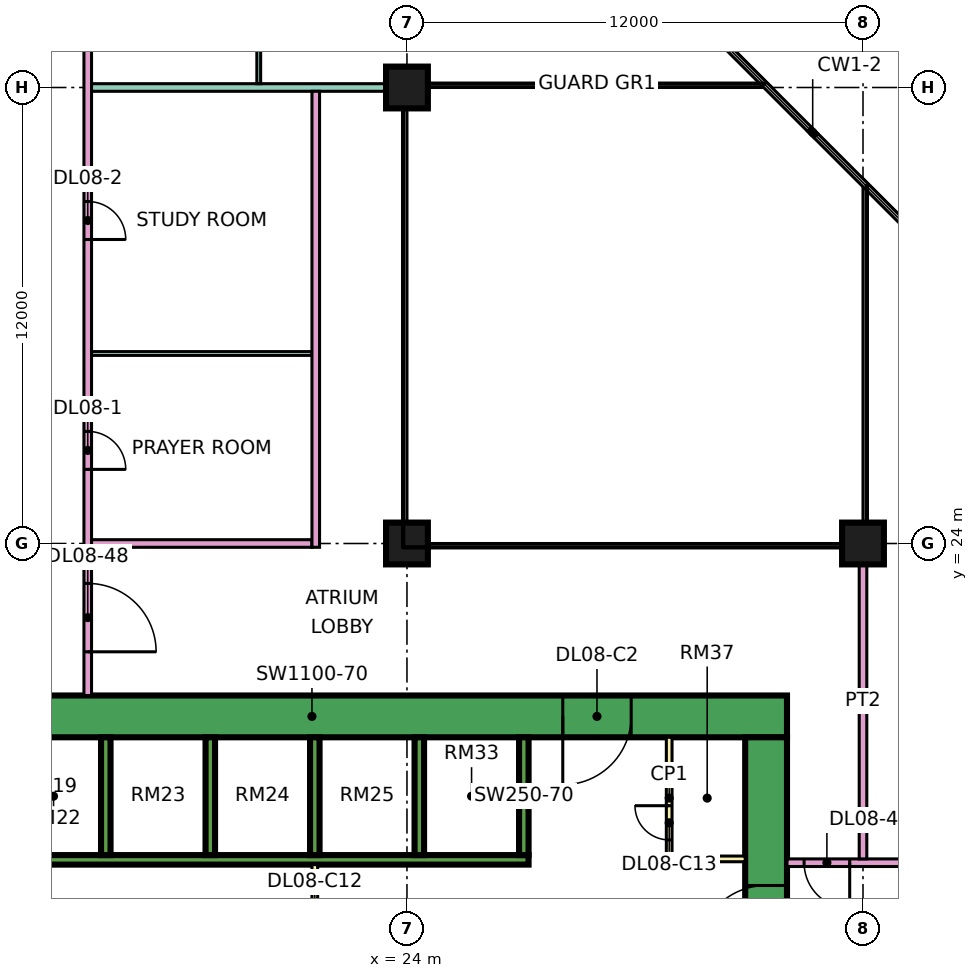
"""IFC4 building model, lengths in metres.
Left out: names, types, materials, properties, quantities, classifications, styles, units other than length and angle.
Written with IfcOpenShell. Run it as: python <this file> out.ifc"""

import sys

from ifc_helpers import new_model, si_unit, direction, frame, frame_2d, origin, origin_2d, place, context, subcontext, project, spatial, rectangle, extrude, element, fill, save


model = new_model("IFC4")
c1 = context("Model", 3, precision=1e-05, world=origin(), true_north=direction((0.0, 1.0)))
c2 = subcontext(c1, "Body", "Model", "MODEL_VIEW")
j1 = project(units=[si_unit("LENGTHUNIT", "METRE"), si_unit("PLANEANGLEUNIT", "RADIAN")], contexts=[c1])
p1 = place(None, origin())
s1 = spatial("IfcSite", under=j1, at=p1, CompositionType="ELEMENT")
p2 = place(p1, origin())
s2 = spatial("IfcBuilding", under=s1, at=p2, CompositionType="ELEMENT")
p3 = place(p2, frame((0.0, 0.0, 45.15)))
s3 = spatial("IfcBuildingStorey", under=s2, at=p3, CompositionType="ELEMENT", Elevation=45.15)
for number, where, z_axis, x_axis in (
    (1, (24.0, 24.0, 0.0), (0.0, 0.0, 1.0), (1.0, 0.0, 0.0)),
    (2, (24.0, 36.0, 0.0), (0.0, 0.0, 1.0), (1.0, 0.0, 0.0)),
    (3, (36.0, 24.0, 0.0), (0.0, 0.0, 1.0), (1.0, 0.0, 0.0)),
):
    element("IfcColumn", number, at=place(p3, frame(where, z_axis=z_axis, x_axis=x_axis)), inside=s3, PredefinedType="COLUMN", context=c2, shape_type="SweptSolid", body=[
        extrude(rectangle(XDim=1.1, YDim=1.1, at=origin_2d()), origin(), (0.0, 0.0, 1.0), 3.75),
    ])
p4 = place(p3, frame((9.0, 19.45, 0.0), z_axis=(0.0, 0.0, 1.0), x_axis=(1.0, 0.0, 0.0)))
e4 = element("IfcWall", 4, at=p4, inside=s3, PredefinedType="SHEAR", context=c2, shape_type="SweptSolid", body=[
    extrude(rectangle(XDim=25.0, YDim=1.1, at=frame_2d((12.5, 0.0))), origin(), (0.0, 0.0, 1.0), 3.75),
])
p5 = place(p4, frame((19.1, 0.0, 0.0)))
e5 = element("IfcOpeningElement", 5, at=p5, cuts=e4, PredefinedType="OPENING", context=c2, shape_type="SweptSolid", body=[
    extrude(rectangle(XDim=1.8, YDim=2.4, at=frame_2d((0.9, 1.2))), frame((0.0, 0.56, 0.0), z_axis=(0.0, -1.0, 0.0), x_axis=(1.0, 0.0, 0.0)), (0.0, 0.0, 1.0), 1.12),
])
p6 = place(p3, frame((33.45, 8.1, 0.0), z_axis=(0.0, 0.0, 1.0), x_axis=(0.0, 1.0, 0.0)))
e6 = element("IfcWall", 6, at=p6, inside=s3, PredefinedType="SHEAR", context=c2, shape_type="SweptSolid", body=[
    extrude(rectangle(XDim=10.8, YDim=1.1, at=frame_2d((5.4, 0.0))), origin(), (0.0, 0.0, 1.0), 3.75),
])
p7 = place(p6, frame((5.1, 0.0, 0.0)))
e7 = element("IfcOpeningElement", 7, at=p7, cuts=e6, PredefinedType="OPENING", context=c2, shape_type="SweptSolid", body=[
    extrude(rectangle(XDim=1.8, YDim=2.4, at=frame_2d((0.9, 1.2))), frame((0.0, 0.56, 0.0), z_axis=(0.0, -1.0, 0.0), x_axis=(1.0, 0.0, 0.0)), (0.0, 0.0, 1.0), 1.12),
])
p8 = place(p3, frame((13.45, 15.675, 0.0), z_axis=(0.0, 0.0, 1.0), x_axis=(1.0, 0.0, 0.0)))
e8 = element("IfcWall", 8, at=p8, inside=s3, PredefinedType="SHEAR", context=c2, shape_type="SweptSolid", body=[
    extrude(rectangle(XDim=13.75, YDim=0.25, at=frame_2d((6.875, 0.0))), origin(), (0.0, 0.0, 1.0), 3.75),
])
for number, where, z_axis, x_axis in (
    (9, (16.075, 15.8, 0.0), (0.0, 0.0, 1.0), (0.0, 1.0, 0.0)),
    (10, (18.825, 15.8, 0.0), (0.0, 0.0, 1.0), (0.0, 1.0, 0.0)),
    (11, (21.575, 15.8, 0.0), (0.0, 0.0, 1.0), (0.0, 1.0, 0.0)),
    (12, (24.325, 15.8, 0.0), (0.0, 0.0, 1.0), (0.0, 1.0, 0.0)),
    (13, (27.075, 15.8, 0.0), (0.0, 0.0, 1.0), (0.0, 1.0, 0.0)),
):
    element("IfcWall", number, at=place(p3, frame(where, z_axis=z_axis, x_axis=x_axis)), inside=s3, PredefinedType="SHEAR", context=c2, shape_type="SweptSolid", body=[
        extrude(rectangle(XDim=3.1, YDim=0.25, at=frame_2d((1.55, 0.0))), origin(), (0.0, 0.0, 1.0), 3.75),
    ])
p9 = place(p3, frame((21.575, 11.45, 0.0), z_axis=(0.0, 0.0, 1.0), x_axis=(0.0, 1.0, 0.0)))
e14 = element("IfcWall", 14, at=p9, inside=s3, PredefinedType="PARTITIONING", context=c2, shape_type="SweptSolid", body=[
    extrude(rectangle(XDim=4.1, YDim=0.15, at=frame_2d((2.05, 0.0))), origin(), (0.0, 0.0, 1.0), 3.35),
])
p10 = place(p9, frame((1.15, 0.0, 0.0)))
e15 = element("IfcOpeningElement", 15, at=p10, cuts=e14, PredefinedType="OPENING", context=c2, shape_type="SweptSolid", body=[
    extrude(rectangle(XDim=1.8, YDim=2.4, at=frame_2d((0.9, 1.2))), frame((0.0, 0.085, 0.0), z_axis=(0.0, -1.0, 0.0), x_axis=(1.0, 0.0, 0.0)), (0.0, 0.0, 1.0), 0.17),
])
p11 = place(p3, frame((30.9, 15.7, 0.0), z_axis=(0.0, 0.0, 1.0), x_axis=(0.0, 1.0, 0.0)))
e16 = element("IfcWall", 16, at=p11, inside=s3, PredefinedType="PARTITIONING", context=c2, shape_type="SweptSolid", body=[
    extrude(rectangle(XDim=3.2, YDim=0.15, at=frame_2d((1.6, 0.0))), origin(), (0.0, 0.0, 1.0), 3.35),
])
p12 = place(p11, frame((0.5, 0.0, 0.0)))
e17 = element("IfcOpeningElement", 17, at=p12, cuts=e16, PredefinedType="OPENING", context=c2, shape_type="SweptSolid", body=[
    extrude(rectangle(XDim=0.9, YDim=2.1, at=frame_2d((0.45, 1.05))), frame((0.0, 0.085, 0.0), z_axis=(0.0, -1.0, 0.0), x_axis=(1.0, 0.0, 0.0)), (0.0, 0.0, 1.0), 0.17),
])
p13 = place(p3, frame((30.9, 15.7, 0.0), z_axis=(0.0, 0.0, 1.0), x_axis=(1.0, 0.0, 0.0)))
e18 = element("IfcWall", 18, at=p13, inside=s3, PredefinedType="PARTITIONING", context=c2, shape_type="SweptSolid", body=[
    extrude(rectangle(XDim=2.0, YDim=0.15, at=frame_2d((1.0, 0.0))), origin(), (0.0, 0.0, 1.0), 3.35),
])
p14 = place(p3, frame((15.6, 20.0, 0.0), z_axis=(0.0, 0.0, 1.0), x_axis=(0.0, 1.0, 0.0)))
e19 = element("IfcWall", 19, at=p14, inside=s3, PredefinedType="PARTITIONING", context=c2, shape_type="SweptSolid", body=[
    extrude(rectangle(XDim=27.775, YDim=0.2, at=frame_2d((13.887, 0.0))), origin(), (0.0, 0.0, 1.0), 3.35),
])
p15 = place(p14, frame((5.95, 0.0, 0.0)))
e20 = element("IfcOpeningElement", 20, at=p15, cuts=e19, PredefinedType="OPENING", context=c2, shape_type="SweptSolid", body=[
    extrude(rectangle(XDim=1.0, YDim=2.1, at=frame_2d((0.5, 1.05))), frame((0.0, 0.11, 0.0), z_axis=(0.0, -1.0, 0.0), x_axis=(1.0, 0.0, 0.0)), (0.0, 0.0, 1.0), 0.22),
])
p16 = place(p14, frame((12.0, 0.0, 0.0)))
e21 = element("IfcOpeningElement", 21, at=p16, cuts=e19, PredefinedType="OPENING", context=c2, shape_type="SweptSolid", body=[
    extrude(rectangle(XDim=1.0, YDim=2.1, at=frame_2d((0.5, 1.05))), frame((0.0, 0.11, 0.0), z_axis=(0.0, -1.0, 0.0), x_axis=(1.0, 0.0, 0.0)), (0.0, 0.0, 1.0), 0.22),
])
p17 = place(p14, frame((17.05, 0.0, 0.0)))
e22 = element("IfcOpeningElement", 22, at=p17, cuts=e19, PredefinedType="OPENING", context=c2, shape_type="SweptSolid", body=[
    extrude(rectangle(XDim=1.0, YDim=2.1, at=frame_2d((0.5, 1.05))), frame((0.0, 0.11, 0.0), z_axis=(0.0, -1.0, 0.0), x_axis=(1.0, 0.0, 0.0)), (0.0, 0.0, 1.0), 0.22),
])
p18 = place(p14, frame((1.15, 0.0, 0.0)))
e23 = element("IfcOpeningElement", 23, at=p18, cuts=e19, PredefinedType="OPENING", context=c2, shape_type="SweptSolid", body=[
    extrude(rectangle(XDim=1.8, YDim=2.1, at=frame_2d((0.9, 1.05))), frame((0.0, 0.11, 0.0), z_axis=(0.0, -1.0, 0.0), x_axis=(1.0, 0.0, 0.0)), (0.0, 0.0, 1.0), 0.22),
])
p19 = place(p14, frame((25.9, 0.0, 0.0)))
e24 = element("IfcOpeningElement", 24, at=p19, cuts=e19, PredefinedType="OPENING", context=c2, shape_type="SweptSolid", body=[
    extrude(rectangle(XDim=1.0, YDim=2.1, at=frame_2d((0.5, 1.05))), frame((0.0, 0.11, 0.0), z_axis=(0.0, -1.0, 0.0), x_axis=(1.0, 0.0, 0.0)), (0.0, 0.0, 1.0), 0.22),
])
p20 = place(p3, frame((15.7, 24.0, 0.0), z_axis=(0.0, 0.0, 1.0), x_axis=(1.0, 0.0, 0.0)))
e25 = element("IfcWall", 25, at=p20, inside=s3, PredefinedType="PARTITIONING", context=c2, shape_type="SweptSolid", body=[
    extrude(rectangle(XDim=5.8, YDim=0.2, at=frame_2d((2.9, 0.0))), origin(), (0.0, 0.0, 1.0), 3.35),
])
p21 = place(p3, frame((15.7, 29.0, 0.0), z_axis=(0.0, 0.0, 1.0), x_axis=(1.0, 0.0, 0.0)))
e26 = element("IfcWall", 26, at=p21, inside=s3, PredefinedType="PARTITIONING", context=c2, shape_type="SweptSolid", body=[
    extrude(rectangle(XDim=5.8, YDim=0.1, at=frame_2d((2.9, 0.0))), origin(), (0.0, 0.0, 1.0), 3.35),
])
p22 = place(p3, frame((15.7, 36.0, 0.0), z_axis=(0.0, 0.0, 1.0), x_axis=(1.0, 0.0, 0.0)))
e27 = element("IfcWall", 27, at=p22, inside=s3, PredefinedType="PARTITIONING", context=c2, shape_type="SweptSolid", body=[
    extrude(rectangle(XDim=8.3, YDim=0.2, at=frame_2d((4.15, 0.0))), origin(), (0.0, 0.0, 1.0), 3.35),
])
p23 = place(p3, frame((20.1, 36.1, 0.0), z_axis=(0.0, 0.0, 1.0), x_axis=(0.0, 1.0, 0.0)))
e28 = element("IfcWall", 28, at=p23, inside=s3, PredefinedType="PARTITIONING", context=c2, shape_type="SweptSolid", body=[
    extrude(rectangle(XDim=2.85, YDim=0.1, at=frame_2d((1.425, 0.0))), origin(), (0.0, 0.0, 1.0), 3.35),
])
p24 = place(p23, frame((0.95, 0.0, 0.0)))
e29 = element("IfcOpeningElement", 29, at=p24, cuts=e28, PredefinedType="OPENING", context=c2, shape_type="SweptSolid", body=[
    extrude(rectangle(XDim=0.9, YDim=2.1, at=frame_2d((0.45, 1.05))), frame((0.0, 0.06, 0.0), z_axis=(0.0, -1.0, 0.0), x_axis=(1.0, 0.0, 0.0)), (0.0, 0.0, 1.0), 0.12),
])
p25 = place(p3, frame((21.6, 23.9, 0.0), z_axis=(0.0, 0.0, 1.0), x_axis=(0.0, 1.0, 0.0)))
e30 = element("IfcWall", 30, at=p25, inside=s3, PredefinedType="PARTITIONING", context=c2, shape_type="SweptSolid", body=[
    extrude(rectangle(XDim=12.0, YDim=0.2, at=frame_2d((6.0, 0.0))), origin(), (0.0, 0.0, 1.0), 3.35),
])
p26 = place(p3, frame((34.0, 15.6, 0.0), z_axis=(0.0, 0.0, 1.0), x_axis=(1.0, 0.0, 0.0)))
e31 = element("IfcWall", 31, at=p26, inside=s3, PredefinedType="PARTITIONING", context=c2, shape_type="SweptSolid", body=[
    extrude(rectangle(XDim=10.35, YDim=0.2, at=frame_2d((5.175, 0.0))), origin(), (0.0, 0.0, 1.0), 3.35),
])
p27 = place(p26, frame((5.6, 0.0, 0.0)))
e32 = element("IfcOpeningElement", 32, at=p27, cuts=e31, PredefinedType="OPENING", context=c2, shape_type="SweptSolid", body=[
    extrude(rectangle(XDim=1.0, YDim=2.1, at=frame_2d((0.5, 1.05))), frame((0.0, 0.11, 0.0), z_axis=(0.0, -1.0, 0.0), x_axis=(1.0, 0.0, 0.0)), (0.0, 0.0, 1.0), 0.22),
])
p28 = place(p26, frame((0.45, 0.0, 0.0)))
e33 = element("IfcOpeningElement", 33, at=p28, cuts=e31, PredefinedType="OPENING", context=c2, shape_type="SweptSolid", body=[
    extrude(rectangle(XDim=1.2, YDim=2.1, at=frame_2d((0.6, 1.05))), frame((0.0, 0.11, 0.0), z_axis=(0.0, -1.0, 0.0), x_axis=(1.0, 0.0, 0.0)), (0.0, 0.0, 1.0), 0.22),
])
p29 = place(p3, frame((36.0, 15.7, 0.0), z_axis=(0.0, 0.0, 1.0), x_axis=(0.0, 1.0, 0.0)))
e34 = element("IfcWall", 34, at=p29, inside=s3, PredefinedType="PARTITIONING", context=c2, shape_type="SweptSolid", body=[
    extrude(rectangle(XDim=8.3, YDim=0.2, at=frame_2d((4.15, 0.0))), origin(), (0.0, 0.0, 1.0), 3.35),
])
p30 = place(p7, origin())
e35 = element("IfcDoor", 35, at=p30, inside=s3, OperationType="DOUBLE_DOOR_SINGLE_SWING", PredefinedType="DOOR", context=c2, shape_type="SweptSolid", body=[
    extrude(rectangle(XDim=1.8, YDim=2.4, at=frame_2d((0.9, 1.2))), frame((0.0, 0.025, 0.0), z_axis=(0.0, -1.0, 0.0), x_axis=(1.0, 0.0, 0.0)), (0.0, 0.0, 1.0), 0.05),
])
fill(e7, e35)
p31 = place(p5, frame((1.8, 0.0, 0.0), z_axis=(0.0, 0.0, 1.0), x_axis=(-1.0, 0.0, 0.0)))
e36 = element("IfcDoor", 36, at=p31, inside=s3, OperationType="DOUBLE_DOOR_SINGLE_SWING", PredefinedType="DOOR", context=c2, shape_type="SweptSolid", body=[
    extrude(rectangle(XDim=1.8, YDim=2.4, at=frame_2d((0.9, 1.2))), frame((0.0, 0.025, 0.0), z_axis=(0.0, -1.0, 0.0), x_axis=(1.0, 0.0, 0.0)), (0.0, 0.0, 1.0), 0.05),
])
fill(e5, e36)
p32 = place(p12, frame((0.9, 0.0, 0.0), z_axis=(0.0, 0.0, 1.0), x_axis=(-1.0, 0.0, 0.0)))
e37 = element("IfcDoor", 37, at=p32, inside=s3, OperationType="SINGLE_SWING_RIGHT", PredefinedType="DOOR", context=c2, shape_type="SweptSolid", body=[
    extrude(rectangle(XDim=0.9, YDim=2.1, at=frame_2d((0.45, 1.05))), frame((0.0, 0.025, 0.0), z_axis=(0.0, -1.0, 0.0), x_axis=(1.0, 0.0, 0.0)), (0.0, 0.0, 1.0), 0.05),
])
fill(e17, e37)
p33 = place(p15, frame((1.0, 0.0, 0.0), z_axis=(0.0, 0.0, 1.0), x_axis=(-1.0, 0.0, 0.0)))
e38 = element("IfcDoor", 38, at=p33, inside=s3, OperationType="SINGLE_SWING_LEFT", PredefinedType="DOOR", context=c2, shape_type="SweptSolid", body=[
    extrude(rectangle(XDim=1.0, YDim=2.1, at=frame_2d((0.5, 1.05))), frame((0.0, 0.025, 0.0), z_axis=(0.0, -1.0, 0.0), x_axis=(1.0, 0.0, 0.0)), (0.0, 0.0, 1.0), 0.05),
])
fill(e20, e38)
p34 = place(p16, frame((1.0, 0.0, 0.0), z_axis=(0.0, 0.0, 1.0), x_axis=(-1.0, 0.0, 0.0)))
e39 = element("IfcDoor", 39, at=p34, inside=s3, OperationType="SINGLE_SWING_LEFT", PredefinedType="DOOR", context=c2, shape_type="SweptSolid", body=[
    extrude(rectangle(XDim=1.0, YDim=2.1, at=frame_2d((0.5, 1.05))), frame((0.0, 0.025, 0.0), z_axis=(0.0, -1.0, 0.0), x_axis=(1.0, 0.0, 0.0)), (0.0, 0.0, 1.0), 0.05),
])
fill(e21, e39)
p35 = place(p28, origin())
e40 = element("IfcDoor", 40, at=p35, inside=s3, OperationType="SINGLE_SWING_RIGHT", PredefinedType="DOOR", context=c2, shape_type="SweptSolid", body=[
    extrude(rectangle(XDim=1.2, YDim=2.1, at=frame_2d((0.6, 1.05))), frame((0.0, 0.025, 0.0), z_axis=(0.0, -1.0, 0.0), x_axis=(1.0, 0.0, 0.0)), (0.0, 0.0, 1.0), 0.05),
])
fill(e33, e40)
p36 = place(p18, frame((1.8, 0.0, 0.0), z_axis=(0.0, 0.0, 1.0), x_axis=(-1.0, 0.0, 0.0)))
e41 = element("IfcDoor", 41, at=p36, inside=s3, OperationType="DOUBLE_DOOR_SINGLE_SWING", PredefinedType="DOOR", context=c2, shape_type="SweptSolid", body=[
    extrude(rectangle(XDim=1.8, YDim=2.1, at=frame_2d((0.9, 1.05))), frame((0.0, 0.025, 0.0), z_axis=(0.0, -1.0, 0.0), x_axis=(1.0, 0.0, 0.0)), (0.0, 0.0, 1.0), 0.05),
])
fill(e23, e41)
save(model, sys.argv[1])
